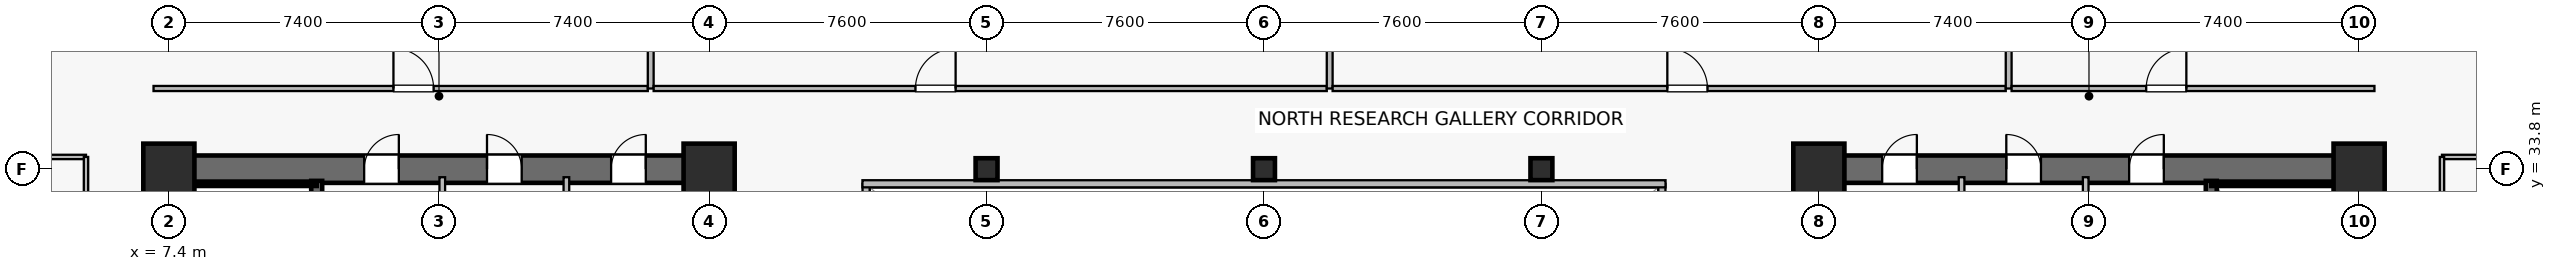
"""IFC4 building model, lengths in metres.
Left out: names, types, materials, properties, quantities, classifications, styles, units other than length and angle.
Written with IfcOpenShell. Run it as: python <this file> out.ifc"""

import sys

from ifc_helpers import new_model, si_unit, direction, frame, frame_2d, origin, origin_2d, place, context, subcontext, project, spatial, rectangle, hollow_rectangle, extrude, source, transform, mapped, element, fill, save


model = new_model("IFC4")
c1 = context("Model", 3, precision=1e-05, world=origin(), true_north=direction((0.0, 1.0)))
c2 = subcontext(c1, "Body", "Model", "MODEL_VIEW")
j1 = project(units=[si_unit("LENGTHUNIT", "METRE"), si_unit("PLANEANGLEUNIT", "RADIAN")], contexts=[c1])
p1 = place(None, origin())
s1 = spatial("IfcSite", under=j1, at=p1, CompositionType="ELEMENT")
p2 = place(p1, origin())
s2 = spatial("IfcBuilding", under=s1, at=p2, CompositionType="ELEMENT")
p3 = place(p2, frame((0.0, 0.0, 29.3)))
s3 = spatial("IfcBuildingStorey", under=s2, at=p3, CompositionType="ELEMENT", Elevation=29.3)
p4 = place(p3, frame((7.025, 33.8, 0.0), z_axis=(0.0, 0.0, 1.0), x_axis=(1.0, 0.0, 0.0)))
e1 = element("IfcWall", 1, at=p4, inside=s3, PredefinedType="SHEAR", context=c2, shape_type="SweptSolid", body=[
    extrude(rectangle(XDim=15.55, YDim=0.75, at=frame_2d((7.775, 0.0))), origin(), (0.0, 0.0, 1.0), 3.78),
])
p5 = place(p4, frame((5.725, 0.0, 0.0)))
e2 = element("IfcOpeningElement", 2, at=p5, cuts=e1, PredefinedType="OPENING", context=c2, shape_type="SweptSolid", body=[
    extrude(rectangle(XDim=0.95, YDim=2.15, at=frame_2d((0.475, 1.075))), frame((0.0, 0.385, 0.0), z_axis=(0.0, -1.0, 0.0), x_axis=(1.0, 0.0, 0.0)), (0.0, 0.0, 1.0), 0.77),
])
p6 = place(p4, frame((9.09, 0.0, 0.0)))
e3 = element("IfcOpeningElement", 3, at=p6, cuts=e1, PredefinedType="OPENING", context=c2, shape_type="SweptSolid", body=[
    extrude(rectangle(XDim=0.95, YDim=2.15, at=frame_2d((0.475, 1.075))), frame((0.0, 0.385, 0.0), z_axis=(0.0, -1.0, 0.0), x_axis=(1.0, 0.0, 0.0)), (0.0, 0.0, 1.0), 0.77),
])
p7 = place(p4, frame((12.49, 0.0, 0.0)))
e4 = element("IfcOpeningElement", 4, at=p7, cuts=e1, PredefinedType="OPENING", context=c2, shape_type="SweptSolid", body=[
    extrude(rectangle(XDim=0.95, YDim=2.15, at=frame_2d((0.475, 1.075))), frame((0.0, 0.385, 0.0), z_axis=(0.0, -1.0, 0.0), x_axis=(1.0, 0.0, 0.0)), (0.0, 0.0, 1.0), 0.77),
])
p8 = place(p3, frame((7.4, 15.175, 0.0), z_axis=(0.0, 0.0, 1.0), x_axis=(0.0, 1.0, 0.0)))
e5 = element("IfcWall", 5, at=p8, inside=s3, PredefinedType="SHEAR", context=c2, shape_type="SweptSolid", body=[
    extrude(rectangle(XDim=18.25, YDim=0.75, at=frame_2d((9.125, 0.0))), origin(), (0.0, 0.0, 1.0), 3.78),
])
p9 = place(p3, frame((22.2, 15.175, 0.0), z_axis=(0.0, 0.0, 1.0), x_axis=(0.0, 1.0, 0.0)))
e6 = element("IfcWall", 6, at=p9, inside=s3, PredefinedType="SHEAR", context=c2, shape_type="SweptSolid", body=[
    extrude(rectangle(XDim=18.25, YDim=0.75, at=frame_2d((9.125, 0.0))), origin(), (0.0, 0.0, 1.0), 3.78),
])
p10 = place(p9, frame((3.375, 0.0, 0.0)))
e7 = element("IfcOpeningElement", 7, at=p10, cuts=e6, PredefinedType="OPENING", context=c2, shape_type="SweptSolid", body=[
    extrude(rectangle(XDim=1.42, YDim=2.2, at=frame_2d((0.71, 1.1))), frame((0.0, 0.385, 0.0), z_axis=(0.0, -1.0, 0.0), x_axis=(1.0, 0.0, 0.0)), (0.0, 0.0, 1.0), 0.77),
])
p11 = place(p3, frame((11.45, 24.85, 0.0), z_axis=(0.0, 0.0, 1.0), x_axis=(0.0, 1.0, 0.0)))
e8 = element("IfcWall", 8, at=p11, inside=s3, PredefinedType="SHEAR", context=c2, shape_type="SweptSolid", body=[
    extrude(rectangle(XDim=8.63, YDim=0.3, at=frame_2d((4.315, 0.0))), origin(), (0.0, 0.0, 1.0), 3.78),
])
p12 = place(p11, frame((0.42, 0.0, 0.0)))
e9 = element("IfcOpeningElement", 9, at=p12, cuts=e8, PredefinedType="OPENING", context=c2, shape_type="SweptSolid", body=[
    extrude(rectangle(XDim=1.1, YDim=2.15, at=frame_2d((0.55, 1.075))), frame((0.0, 0.16, 0.0), z_axis=(0.0, -1.0, 0.0), x_axis=(1.0, 0.0, 0.0)), (0.0, 0.0, 1.0), 0.32),
])
p13 = place(p3, frame((7.73, 33.4, 0.0), z_axis=(0.0, 0.0, 1.0), x_axis=(1.0, 0.0, 0.0)))
e10 = element("IfcWall", 10, at=p13, inside=s3, PredefinedType="SOLIDWALL", context=c2, shape_type="SweptSolid", body=[
    extrude(rectangle(XDim=3.72, YDim=0.12, at=frame_2d((1.86, 0.0))), origin(), (0.0, 0.0, 1.0), 3.78),
])
p14 = place(p3, frame((52.225, 33.8, 0.0), z_axis=(0.0, 0.0, 1.0), x_axis=(1.0, 0.0, 0.0)))
e11 = element("IfcWall", 11, at=p14, inside=s3, PredefinedType="SHEAR", context=c2, shape_type="SweptSolid", body=[
    extrude(rectangle(XDim=15.55, YDim=0.75, at=frame_2d((7.775, 0.0))), origin(), (0.0, 0.0, 1.0), 3.78),
])
p15 = place(p14, frame((8.875, 0.0, 0.0)))
e12 = element("IfcOpeningElement", 12, at=p15, cuts=e11, PredefinedType="OPENING", context=c2, shape_type="SweptSolid", body=[
    extrude(rectangle(XDim=0.95, YDim=2.15, at=frame_2d((0.475, 1.075))), frame((0.0, 0.385, 0.0), z_axis=(0.0, -1.0, 0.0), x_axis=(1.0, 0.0, 0.0)), (0.0, 0.0, 1.0), 0.77),
])
p16 = place(p14, frame((5.51, 0.0, 0.0)))
e13 = element("IfcOpeningElement", 13, at=p16, cuts=e11, PredefinedType="OPENING", context=c2, shape_type="SweptSolid", body=[
    extrude(rectangle(XDim=0.95, YDim=2.15, at=frame_2d((0.475, 1.075))), frame((0.0, 0.385, 0.0), z_axis=(0.0, -1.0, 0.0), x_axis=(1.0, 0.0, 0.0)), (0.0, 0.0, 1.0), 0.77),
])
p17 = place(p14, frame((2.11, 0.0, 0.0)))
e14 = element("IfcOpeningElement", 14, at=p17, cuts=e11, PredefinedType="OPENING", context=c2, shape_type="SweptSolid", body=[
    extrude(rectangle(XDim=0.95, YDim=2.15, at=frame_2d((0.475, 1.075))), frame((0.0, 0.385, 0.0), z_axis=(0.0, -1.0, 0.0), x_axis=(1.0, 0.0, 0.0)), (0.0, 0.0, 1.0), 0.77),
])
p18 = place(p3, frame((52.6, 15.175, 0.0), z_axis=(0.0, 0.0, 1.0), x_axis=(0.0, 1.0, 0.0)))
e15 = element("IfcWall", 15, at=p18, inside=s3, PredefinedType="SHEAR", context=c2, shape_type="SweptSolid", body=[
    extrude(rectangle(XDim=18.25, YDim=0.75, at=frame_2d((9.125, 0.0))), origin(), (0.0, 0.0, 1.0), 3.78),
])
p19 = place(p18, frame((3.375, 0.0, 0.0)))
e16 = element("IfcOpeningElement", 16, at=p19, cuts=e15, PredefinedType="OPENING", context=c2, shape_type="SweptSolid", body=[
    extrude(rectangle(XDim=1.42, YDim=2.2, at=frame_2d((0.71, 1.1))), frame((0.0, 0.385, 0.0), z_axis=(0.0, -1.0, 0.0), x_axis=(1.0, 0.0, 0.0)), (0.0, 0.0, 1.0), 0.77),
])
p20 = place(p3, frame((67.4, 15.175, 0.0), z_axis=(0.0, 0.0, 1.0), x_axis=(0.0, 1.0, 0.0)))
e17 = element("IfcWall", 17, at=p20, inside=s3, PredefinedType="SHEAR", context=c2, shape_type="SweptSolid", body=[
    extrude(rectangle(XDim=18.25, YDim=0.75, at=frame_2d((9.125, 0.0))), origin(), (0.0, 0.0, 1.0), 3.78),
])
p21 = place(p3, frame((63.35, 24.85, 0.0), z_axis=(0.0, 0.0, 1.0), x_axis=(0.0, 1.0, 0.0)))
e18 = element("IfcWall", 18, at=p21, inside=s3, PredefinedType="SHEAR", context=c2, shape_type="SweptSolid", body=[
    extrude(rectangle(XDim=8.63, YDim=0.3, at=frame_2d((4.315, 0.0))), origin(), (0.0, 0.0, 1.0), 3.78),
])
p22 = place(p21, frame((0.42, 0.0, 0.0)))
e19 = element("IfcOpeningElement", 19, at=p22, cuts=e18, PredefinedType="OPENING", context=c2, shape_type="SweptSolid", body=[
    extrude(rectangle(XDim=1.1, YDim=2.15, at=frame_2d((0.55, 1.075))), frame((0.0, 0.16, 0.0), z_axis=(0.0, -1.0, 0.0), x_axis=(1.0, 0.0, 0.0)), (0.0, 0.0, 1.0), 0.32),
])
p23 = place(p3, frame((63.35, 33.4, 0.0), z_axis=(0.0, 0.0, 1.0), x_axis=(1.0, 0.0, 0.0)))
e20 = element("IfcWall", 20, at=p23, inside=s3, PredefinedType="SOLIDWALL", context=c2, shape_type="SweptSolid", body=[
    extrude(rectangle(XDim=3.72, YDim=0.12, at=frame_2d((1.86, 0.0))), origin(), (0.0, 0.0, 1.0), 3.78),
])
m1 = source(origin(), c2, "Body", "SweptSolid", [
    extrude(rectangle(XDim=1.4, YDim=1.4, at=origin_2d()), origin(), (0.0, 0.0, 1.0), 4.1),
])
for number, where, z_axis, x_axis in (
    (21, (7.4, 33.8, 0.0), (0.0, 0.0, 1.0), (1.0, 0.0, 0.0)),
    (22, (22.2, 33.8, 0.0), (0.0, 0.0, 1.0), (1.0, 0.0, 0.0)),
    (23, (52.6, 33.8, 0.0), (0.0, 0.0, 1.0), (1.0, 0.0, 0.0)),
    (24, (67.4, 33.8, 0.0), (0.0, 0.0, 1.0), (1.0, 0.0, 0.0)),
):
    element("IfcColumn", number, at=place(p3, frame(where, z_axis=z_axis, x_axis=x_axis)), inside=s3, PredefinedType="COLUMN", context=c2, shape_type="MappedRepresentation", body=[
        mapped(m1, transform((0.0, 0.0, 0.0), scale=1.0)),
    ])
m2 = source(origin(), c2, "Body", "SweptSolid", [
    extrude(hollow_rectangle(XDim=0.6, YDim=0.6, WallThickness=0.028, at=origin_2d()), origin(), (0.0, 0.0, 1.0), 4.1),
])
for number, where, z_axis, x_axis in (
    (25, (29.8, 33.8, 0.0), (0.0, 0.0, 1.0), (1.0, 0.0, 0.0)),
    (26, (37.4, 33.8, 0.0), (0.0, 0.0, 1.0), (1.0, 0.0, 0.0)),
    (27, (45.0, 33.8, 0.0), (0.0, 0.0, 1.0), (1.0, 0.0, 0.0)),
):
    element("IfcColumn", number, at=place(p3, frame(where, z_axis=z_axis, x_axis=x_axis)), inside=s3, PredefinedType="COLUMN", context=c2, shape_type="MappedRepresentation", body=[
        mapped(m2, transform((0.0, 0.0, 0.0), scale=1.0)),
    ])
p24 = place(p3, frame((14.89, 29.65, 0.0), z_axis=(0.0, 0.0, 1.0), x_axis=(0.0, 1.0, 0.0)))
e28 = element("IfcWall", 28, at=p24, inside=s3, PredefinedType="PLUMBINGWALL", context=c2, shape_type="SweptSolid", body=[
    extrude(rectangle(XDim=3.93, YDim=0.155, at=frame_2d((1.965, 0.0))), origin(), (0.0, 0.0, 1.0), 3.065),
])
p25 = place(p3, frame((18.29, 29.65, 0.0), z_axis=(0.0, 0.0, 1.0), x_axis=(0.0, 1.0, 0.0)))
e29 = element("IfcWall", 29, at=p25, inside=s3, PredefinedType="PLUMBINGWALL", context=c2, shape_type="SweptSolid", body=[
    extrude(rectangle(XDim=3.93, YDim=0.155, at=frame_2d((1.965, 0.0))), origin(), (0.0, 0.0, 1.0), 3.78),
])
p26 = place(p3, frame((59.91, 29.65, 0.0), z_axis=(0.0, 0.0, 1.0), x_axis=(0.0, 1.0, 0.0)))
e30 = element("IfcWall", 30, at=p26, inside=s3, PredefinedType="PLUMBINGWALL", context=c2, shape_type="SweptSolid", body=[
    extrude(rectangle(XDim=3.93, YDim=0.155, at=frame_2d((1.965, 0.0))), origin(), (0.0, 0.0, 1.0), 3.065),
])
p27 = place(p3, frame((56.51, 29.65, 0.0), z_axis=(0.0, 0.0, 1.0), x_axis=(0.0, 1.0, 0.0)))
e31 = element("IfcWall", 31, at=p27, inside=s3, PredefinedType="PLUMBINGWALL", context=c2, shape_type="SweptSolid", body=[
    extrude(rectangle(XDim=3.93, YDim=0.155, at=frame_2d((1.965, 0.0))), origin(), (0.0, 0.0, 1.0), 3.78),
])
p28 = place(p3, frame((26.5, 15.2, 0.0), z_axis=(0.0, 0.0, 1.0), x_axis=(0.0, 1.0, 0.0)))
e32 = element("IfcWall", 32, at=p28, inside=s3, PredefinedType="SOLIDWALL", context=c2, shape_type="SweptSolid", body=[
    extrude(rectangle(XDim=18.2, YDim=0.195, at=frame_2d((9.1, 0.0))), origin(), (0.0, 0.0, 1.0), 3.78),
])
p29 = place(p28, frame((1.8, 0.0, 0.9)))
e33 = element("IfcOpeningElement", 33, at=p29, cuts=e32, PredefinedType="OPENING", context=c2, shape_type="SweptSolid", body=[
    extrude(rectangle(XDim=1.2, YDim=1.35, at=frame_2d((0.6, 0.675))), frame((0.0, 0.107, 0.0), z_axis=(0.0, -1.0, 0.0), x_axis=(1.0, 0.0, 0.0)), (0.0, 0.0, 1.0), 0.215),
])
p30 = place(p28, frame((13.2, 0.0, 0.9)))
e34 = element("IfcOpeningElement", 34, at=p30, cuts=e32, PredefinedType="OPENING", context=c2, shape_type="SweptSolid", body=[
    extrude(rectangle(XDim=1.2, YDim=1.35, at=frame_2d((0.6, 0.675))), frame((0.0, 0.107, 0.0), z_axis=(0.0, -1.0, 0.0), x_axis=(1.0, 0.0, 0.0)), (0.0, 0.0, 1.0), 0.215),
])
p31 = place(p3, frame((48.3, 15.2, 0.0), z_axis=(0.0, 0.0, 1.0), x_axis=(0.0, 1.0, 0.0)))
e35 = element("IfcWall", 35, at=p31, inside=s3, PredefinedType="SOLIDWALL", context=c2, shape_type="SweptSolid", body=[
    extrude(rectangle(XDim=18.2, YDim=0.195, at=frame_2d((9.1, 0.0))), origin(), (0.0, 0.0, 1.0), 3.78),
])
p32 = place(p31, frame((1.8, 0.0, 0.9)))
e36 = element("IfcOpeningElement", 36, at=p32, cuts=e35, PredefinedType="OPENING", context=c2, shape_type="SweptSolid", body=[
    extrude(rectangle(XDim=1.2, YDim=1.35, at=frame_2d((0.6, 0.675))), frame((0.0, 0.107, 0.0), z_axis=(0.0, -1.0, 0.0), x_axis=(1.0, 0.0, 0.0)), (0.0, 0.0, 1.0), 0.215),
])
p33 = place(p31, frame((13.2, 0.0, 0.9)))
e37 = element("IfcOpeningElement", 37, at=p33, cuts=e35, PredefinedType="OPENING", context=c2, shape_type="SweptSolid", body=[
    extrude(rectangle(XDim=1.2, YDim=1.35, at=frame_2d((0.6, 0.675))), frame((0.0, 0.107, 0.0), z_axis=(0.0, -1.0, 0.0), x_axis=(1.0, 0.0, 0.0)), (0.0, 0.0, 1.0), 0.215),
])
p34 = place(p3, frame((26.4, 33.4, 0.0), z_axis=(0.0, 0.0, 1.0), x_axis=(1.0, 0.0, 0.0)))
e38 = element("IfcWall", 38, at=p34, inside=s3, PredefinedType="SOLIDWALL", context=c2, shape_type="SweptSolid", body=[
    extrude(rectangle(XDim=22.0, YDim=0.195, at=frame_2d((11.0, 0.0))), origin(), (0.0, 0.0, 1.0), 3.78),
])
p35 = place(p3, frame((6.98, 36.01, 0.0), z_axis=(0.0, 0.0, 1.0), x_axis=(1.0, 0.0, 0.0)))
e39 = element("IfcWall", 39, at=p35, inside=s3, PredefinedType="PARTITIONING", context=c2, shape_type="SweptSolid", body=[
    extrude(rectangle(XDim=13.54, YDim=0.14, at=frame_2d((6.77, 0.0))), origin(), (0.0, 0.0, 1.0), 3.065),
])
p36 = place(p35, frame((6.572, 0.0, 0.0)))
e40 = element("IfcOpeningElement", 40, at=p36, cuts=e39, PredefinedType="OPENING", context=c2, shape_type="SweptSolid", body=[
    extrude(rectangle(XDim=1.1, YDim=2.18, at=frame_2d((0.55, 1.09))), frame((0.0, 0.08, 0.0), z_axis=(0.0, -1.0, 0.0), x_axis=(1.0, 0.0, 0.0)), (0.0, 0.0, 1.0), 0.16),
])
p37 = place(p3, frame((20.6, 36.01, 0.0), z_axis=(0.0, 0.0, 1.0), x_axis=(0.0, 1.0, 0.0)))
e41 = element("IfcWall", 41, at=p37, inside=s3, PredefinedType="PARTITIONING", context=c2, shape_type="SweptSolid", body=[
    extrude(rectangle(XDim=12.48, YDim=0.16, at=frame_2d((6.24, 0.0))), origin(), (0.0, 0.0, 1.0), 3.015),
])
p38 = place(p3, frame((20.68, 36.01, 0.0), z_axis=(0.0, 0.0, 1.0), x_axis=(1.0, 0.0, 0.0)))
e42 = element("IfcWall", 42, at=p38, inside=s3, PredefinedType="PARTITIONING", context=c2, shape_type="SweptSolid", body=[
    extrude(rectangle(XDim=18.44, YDim=0.14, at=frame_2d((9.22, 0.0))), origin(), (0.0, 0.0, 1.0), 3.065),
])
p39 = place(p38, frame((7.172, 0.0, 0.0)))
e43 = element("IfcOpeningElement", 43, at=p39, cuts=e42, PredefinedType="OPENING", context=c2, shape_type="SweptSolid", body=[
    extrude(rectangle(XDim=1.1, YDim=2.18, at=frame_2d((0.55, 1.09))), frame((0.0, 0.08, 0.0), z_axis=(0.0, -1.0, 0.0), x_axis=(1.0, 0.0, 0.0)), (0.0, 0.0, 1.0), 0.16),
])
p40 = place(p3, frame((39.2, 36.01, 0.0), z_axis=(0.0, 0.0, 1.0), x_axis=(0.0, 1.0, 0.0)))
e44 = element("IfcWall", 44, at=p40, inside=s3, PredefinedType="PARTITIONING", context=c2, shape_type="SweptSolid", body=[
    extrude(rectangle(XDim=11.28, YDim=0.16, at=frame_2d((5.64, 0.0))), origin(), (0.0, 0.0, 1.0), 3.015),
])
p41 = place(p3, frame((39.28, 36.01, 0.0), z_axis=(0.0, 0.0, 1.0), x_axis=(1.0, 0.0, 0.0)))
e45 = element("IfcWall", 45, at=p41, inside=s3, PredefinedType="PARTITIONING", context=c2, shape_type="SweptSolid", body=[
    extrude(rectangle(XDim=18.44, YDim=0.14, at=frame_2d((9.22, 0.0))), origin(), (0.0, 0.0, 1.0), 3.065),
])
p42 = place(p41, frame((9.169, 0.0, 0.0)))
e46 = element("IfcOpeningElement", 46, at=p42, cuts=e45, PredefinedType="OPENING", context=c2, shape_type="SweptSolid", body=[
    extrude(rectangle(XDim=1.1, YDim=2.18, at=frame_2d((0.55, 1.09))), frame((0.0, 0.08, 0.0), z_axis=(0.0, -1.0, 0.0), x_axis=(1.0, 0.0, 0.0)), (0.0, 0.0, 1.0), 0.16),
])
p43 = place(p3, frame((57.8, 36.01, 0.0), z_axis=(0.0, 0.0, 1.0), x_axis=(0.0, 1.0, 0.0)))
e47 = element("IfcWall", 47, at=p43, inside=s3, PredefinedType="PARTITIONING", context=c2, shape_type="SweptSolid", body=[
    extrude(rectangle(XDim=12.48, YDim=0.16, at=frame_2d((6.24, 0.0))), origin(), (0.0, 0.0, 1.0), 3.015),
])
p44 = place(p3, frame((57.88, 36.01, 0.0), z_axis=(0.0, 0.0, 1.0), x_axis=(1.0, 0.0, 0.0)))
e48 = element("IfcWall", 48, at=p44, inside=s3, PredefinedType="PARTITIONING", context=c2, shape_type="SweptSolid", body=[
    extrude(rectangle(XDim=9.94, YDim=0.14, at=frame_2d((4.97, 0.0))), origin(), (0.0, 0.0, 1.0), 3.065),
])
p45 = place(p44, frame((3.688, 0.0, 0.0)))
e49 = element("IfcOpeningElement", 49, at=p45, cuts=e48, PredefinedType="OPENING", context=c2, shape_type="SweptSolid", body=[
    extrude(rectangle(XDim=1.1, YDim=2.18, at=frame_2d((0.55, 1.09))), frame((0.0, 0.08, 0.0), z_axis=(0.0, -1.0, 0.0), x_axis=(1.0, 0.0, 0.0)), (0.0, 0.0, 1.0), 0.16),
])
p46 = place(p3, frame((0.11, 34.135, 0.0), z_axis=(0.0, 0.0, 1.0), x_axis=(1.0, 0.0, 0.0)))
e50 = element("IfcWall", 50, at=p46, inside=s3, PredefinedType="PARTITIONING", context=c2, shape_type="SweptSolid", body=[
    extrude(rectangle(XDim=5.02, YDim=0.12, at=frame_2d((2.51, 0.0))), origin(), (0.0, 0.0, 1.0), 3.78),
])
p47 = place(p3, frame((5.13, 22.46, 0.0), z_axis=(0.0, 0.0, 1.0), x_axis=(0.0, 1.0, 0.0)))
e51 = element("IfcWall", 51, at=p47, inside=s3, PredefinedType="PARTITIONING", context=c2, shape_type="SweptSolid", body=[
    extrude(rectangle(XDim=11.675, YDim=0.12, at=frame_2d((5.837, 0.0))), origin(), (0.0, 0.0, 1.0), 3.78),
])
p48 = place(p47, frame((5.387, 0.0, 0.0)))
e52 = element("IfcOpeningElement", 52, at=p48, cuts=e51, PredefinedType="OPENING", context=c2, shape_type="SweptSolid", body=[
    extrude(rectangle(XDim=0.9, YDim=2.1, at=frame_2d((0.45, 1.05))), frame((0.0, 0.07, 0.0), z_axis=(0.0, -1.0, 0.0), x_axis=(1.0, 0.0, 0.0)), (0.0, 0.0, 1.0), 0.14),
])
p49 = place(p3, frame((69.67, 34.135, 0.0), z_axis=(0.0, 0.0, 1.0), x_axis=(1.0, 0.0, 0.0)))
e53 = element("IfcWall", 53, at=p49, inside=s3, PredefinedType="PARTITIONING", context=c2, shape_type="SweptSolid", body=[
    extrude(rectangle(XDim=5.02, YDim=0.12, at=frame_2d((2.51, 0.0))), origin(), (0.0, 0.0, 1.0), 3.78),
])
p50 = place(p3, frame((69.67, 25.86, 0.0), z_axis=(0.0, 0.0, 1.0), x_axis=(0.0, 1.0, 0.0)))
e54 = element("IfcWall", 54, at=p50, inside=s3, PredefinedType="PARTITIONING", context=c2, shape_type="SweptSolid", body=[
    extrude(rectangle(XDim=8.275, YDim=0.12, at=frame_2d((4.137, 0.0))), origin(), (0.0, 0.0, 1.0), 3.78),
])
p51 = place(p50, frame((3.688, 0.0, 0.0)))
e55 = element("IfcOpeningElement", 55, at=p51, cuts=e54, PredefinedType="OPENING", context=c2, shape_type="SweptSolid", body=[
    extrude(rectangle(XDim=0.9, YDim=2.1, at=frame_2d((0.45, 1.05))), frame((0.0, 0.07, 0.0), z_axis=(0.0, -1.0, 0.0), x_axis=(1.0, 0.0, 0.0)), (0.0, 0.0, 1.0), 0.14),
])
m3 = source(origin(), c2, "Body", "SweptSolid", [
    extrude(rectangle(XDim=0.95, YDim=2.15, at=frame_2d((0.475, 1.075))), frame((0.0, 0.025, 0.0), z_axis=(0.0, -1.0, 0.0), x_axis=(1.0, 0.0, 0.0)), (0.0, 0.0, 1.0), 0.05),
])
p52 = place(p5, origin())
e56 = element("IfcDoor", 56, at=p52, inside=s3, OperationType="SINGLE_SWING_RIGHT", PredefinedType="DOOR", context=c2, shape_type="MappedRepresentation", body=[
    mapped(m3, transform((0.0, 0.0, 0.0), scale=1.0)),
])
fill(e2, e56)
p53 = place(p6, origin())
e57 = element("IfcDoor", 57, at=p53, inside=s3, OperationType="SINGLE_SWING_LEFT", PredefinedType="DOOR", context=c2, shape_type="MappedRepresentation", body=[
    mapped(m3, transform((0.0, 0.0, 0.0), scale=1.0)),
])
fill(e3, e57)
p54 = place(p7, origin())
e58 = element("IfcDoor", 58, at=p54, inside=s3, OperationType="SINGLE_SWING_RIGHT", PredefinedType="DOOR", context=c2, shape_type="MappedRepresentation", body=[
    mapped(m3, transform((0.0, 0.0, 0.0), scale=1.0)),
])
fill(e4, e58)
p55 = place(p15, origin())
e59 = element("IfcDoor", 59, at=p55, inside=s3, OperationType="SINGLE_SWING_RIGHT", PredefinedType="DOOR", context=c2, shape_type="MappedRepresentation", body=[
    mapped(m3, transform((0.0, 0.0, 0.0), scale=1.0)),
])
fill(e12, e59)
p56 = place(p16, origin())
e60 = element("IfcDoor", 60, at=p56, inside=s3, OperationType="SINGLE_SWING_LEFT", PredefinedType="DOOR", context=c2, shape_type="MappedRepresentation", body=[
    mapped(m3, transform((0.0, 0.0, 0.0), scale=1.0)),
])
fill(e13, e60)
p57 = place(p17, origin())
e61 = element("IfcDoor", 61, at=p57, inside=s3, OperationType="SINGLE_SWING_RIGHT", PredefinedType="DOOR", context=c2, shape_type="MappedRepresentation", body=[
    mapped(m3, transform((0.0, 0.0, 0.0), scale=1.0)),
])
fill(e14, e61)
m4 = source(origin(), c2, "Body", "SweptSolid", [
    extrude(rectangle(XDim=1.1, YDim=2.18, at=frame_2d((0.55, 1.09))), frame((0.0, 0.025, 0.0), z_axis=(0.0, -1.0, 0.0), x_axis=(1.0, 0.0, 0.0)), (0.0, 0.0, 1.0), 0.05),
])
p58 = place(p36, origin())
e62 = element("IfcDoor", 62, at=p58, inside=s3, OperationType="SINGLE_SWING_LEFT", PredefinedType="DOOR", context=c2, shape_type="MappedRepresentation", body=[
    mapped(m4, transform((0.0, 0.0, 0.0), scale=1.0)),
])
fill(e40, e62)
p59 = place(p39, origin())
e63 = element("IfcDoor", 63, at=p59, inside=s3, OperationType="SINGLE_SWING_RIGHT", PredefinedType="DOOR", context=c2, shape_type="MappedRepresentation", body=[
    mapped(m4, transform((0.0, 0.0, 0.0), scale=1.0)),
])
fill(e43, e63)
p60 = place(p42, origin())
e64 = element("IfcDoor", 64, at=p60, inside=s3, OperationType="SINGLE_SWING_LEFT", PredefinedType="DOOR", context=c2, shape_type="MappedRepresentation", body=[
    mapped(m4, transform((0.0, 0.0, 0.0), scale=1.0)),
])
fill(e46, e64)
p61 = place(p45, origin())
e65 = element("IfcDoor", 65, at=p61, inside=s3, OperationType="SINGLE_SWING_RIGHT", PredefinedType="DOOR", context=c2, shape_type="MappedRepresentation", body=[
    mapped(m4, transform((0.0, 0.0, 0.0), scale=1.0)),
])
fill(e49, e65)
save(model, sys.argv[1])
